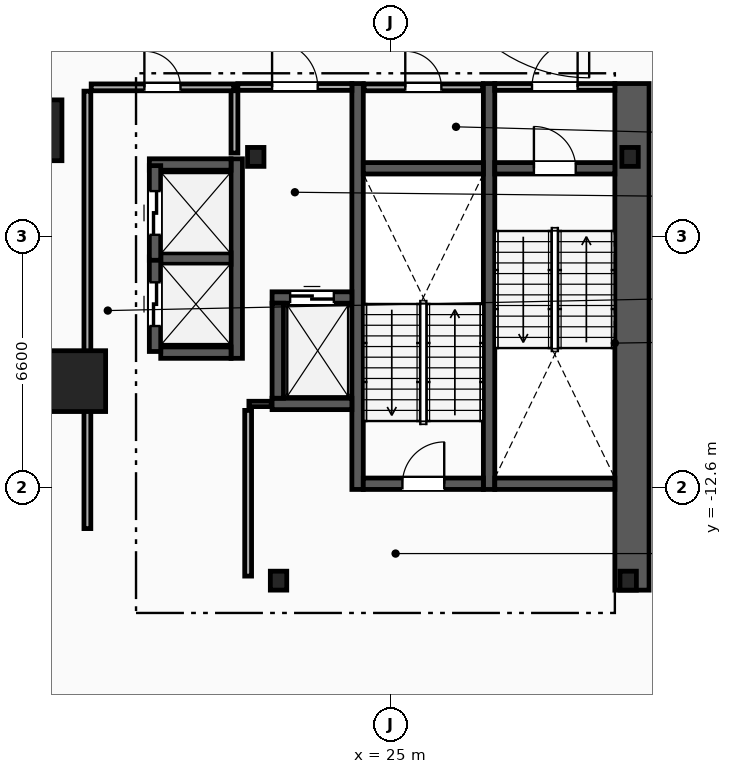
"""IFC4 building model, lengths in metres.
Left out: names, types, materials, properties, quantities, classifications, styles, units other than length and angle.
Written with IfcOpenShell. Run it as: python <this file> out.ifc"""

import sys

from ifc_helpers import new_model, si_unit, direction, frame, frame_2d, origin, origin_2d, place, context, subcontext, project, spatial, rectangle, i_section, extrude, element, fill, save


model = new_model("IFC4")
c1 = context("Model", 3, precision=1e-05, world=origin(), true_north=direction((0.0, 1.0)))
c2 = subcontext(c1, "Body", "Model", "MODEL_VIEW")
j1 = project(units=[si_unit("LENGTHUNIT", "METRE"), si_unit("PLANEANGLEUNIT", "RADIAN")], contexts=[c1])
p1 = place(None, origin())
s1 = spatial("IfcSite", under=j1, at=p1, CompositionType="ELEMENT")
p2 = place(p1, origin())
s2 = spatial("IfcBuilding", under=s1, at=p2, CompositionType="ELEMENT")
p3 = place(p2, frame((0.0, 0.0, -4.5)))
s3 = spatial("IfcBuildingStorey", under=s2, at=p3, CompositionType="ELEMENT", Elevation=-4.5)
for number, where, z_axis, x_axis in (
    (1, (31.3, -3.9, 0.0), (0.0, 0.0, 1.0), (1.0, 0.0, 0.0)),
    (2, (21.45, -3.9, 0.0), (0.0, 0.0, 1.0), (1.0, 0.0, 0.0)),
    (3, (22.05, -15.05, 0.0), (0.0, 0.0, 1.0), (1.0, 0.0, 0.0)),
    (4, (31.25, -15.05, 0.0), (0.0, 0.0, 1.0), (1.0, 0.0, 0.0)),
):
    element("IfcColumn", number, at=place(p3, frame(where, z_axis=z_axis, x_axis=x_axis)), inside=s3, PredefinedType="COLUMN", context=c2, shape_type="SweptSolid", body=[
        extrude(i_section(OverallWidth=0.432, OverallDepth=0.498, WebThickness=0.056, FlangeThickness=0.089, FilletRadius=0.018, at=origin_2d()), origin(), (0.0, 0.0, 1.0), 4.5),
    ])
for number, where, z_axis, x_axis in (
    (5, (15.55, -3.2, 0.0), (0.0, 0.0, 1.0), (1.0, 0.0, 0.0)),
    (6, (16.7, -9.8, 0.0), (0.0, 0.0, 1.0), (1.0, 0.0, 0.0)),
):
    element("IfcColumn", number, at=place(p3, frame(where, z_axis=z_axis, x_axis=x_axis)), inside=s3, PredefinedType="COLUMN", context=c2, shape_type="SweptSolid", body=[
        extrude(rectangle(XDim=1.6, YDim=1.6, at=origin_2d()), origin(), (0.0, 0.0, 1.0), 4.5),
    ])
p4 = place(p3, frame((31.35, -15.3, 0.0), z_axis=(0.0, 0.0, 1.0), x_axis=(0.0, 1.0, 0.0)))
e7 = element("IfcWall", 7, at=p4, inside=s3, PredefinedType="SHEAR", context=c2, shape_type="SweptSolid", body=[
    extrude(rectangle(XDim=13.33, YDim=0.9, at=frame_2d((6.665, 0.0))), origin(), (0.0, 0.0, 1.0), 4.15),
])
for number, where, z_axis, x_axis in (
    (8, (27.59, -12.65, 0.0), (0.0, 0.0, 1.0), (0.0, 1.0, 0.0)),
    (9, (24.13, -12.65, 0.0), (0.0, 0.0, 1.0), (0.0, 1.0, 0.0)),
):
    element("IfcWall", number, at=place(p3, frame(where, z_axis=z_axis, x_axis=x_axis)), inside=s3, PredefinedType="SHEAR", context=c2, shape_type="SweptSolid", body=[
        extrude(rectangle(XDim=10.68, YDim=0.3, at=frame_2d((5.34, 0.0))), origin(), (0.0, 0.0, 1.0), 4.15),
    ])
p5 = place(p3, frame((27.74, -4.2, 0.0), z_axis=(0.0, 0.0, 1.0), x_axis=(1.0, 0.0, 0.0)))
e10 = element("IfcWall", 10, at=p5, inside=s3, PredefinedType="SHEAR", context=c2, shape_type="SweptSolid", body=[
    extrude(rectangle(XDim=3.16, YDim=0.3, at=frame_2d((1.58, 0.0))), origin(), (0.0, 0.0, 1.0), 4.15),
])
p6 = place(p5, frame((1.03, 0.0, 0.0)))
e11 = element("IfcOpeningElement", 11, at=p6, cuts=e10, PredefinedType="OPENING", context=c2, shape_type="SweptSolid", body=[
    extrude(rectangle(XDim=1.1, YDim=2.15, at=frame_2d((0.55, 1.075))), frame((0.0, 0.16, 0.0), z_axis=(0.0, -1.0, 0.0), x_axis=(1.0, 0.0, 0.0)), (0.0, 0.0, 1.0), 0.32),
])
p7 = place(p3, frame((27.74, -12.5, 0.0), z_axis=(0.0, 0.0, 1.0), x_axis=(1.0, 0.0, 0.0)))
e12 = element("IfcWall", 12, at=p7, inside=s3, PredefinedType="SHEAR", context=c2, shape_type="SweptSolid", body=[
    extrude(rectangle(XDim=3.16, YDim=0.3, at=frame_2d((1.58, 0.0))), origin(), (0.0, 0.0, 1.0), 4.15),
])
p8 = place(p3, frame((24.28, -12.5, 0.0), z_axis=(0.0, 0.0, 1.0), x_axis=(1.0, 0.0, 0.0)))
e13 = element("IfcWall", 13, at=p8, inside=s3, PredefinedType="SHEAR", context=c2, shape_type="SweptSolid", body=[
    extrude(rectangle(XDim=3.16, YDim=0.3, at=frame_2d((1.58, 0.0))), origin(), (0.0, 0.0, 1.0), 4.15),
])
p9 = place(p8, frame((1.03, 0.0, 0.0)))
e14 = element("IfcOpeningElement", 14, at=p9, cuts=e13, PredefinedType="OPENING", context=c2, shape_type="SweptSolid", body=[
    extrude(rectangle(XDim=1.1, YDim=2.15, at=frame_2d((0.55, 1.075))), frame((0.0, 0.16, 0.0), z_axis=(0.0, -1.0, 0.0), x_axis=(1.0, 0.0, 0.0)), (0.0, 0.0, 1.0), 0.32),
])
p10 = place(p3, frame((24.28, -4.2, 0.0), z_axis=(0.0, 0.0, 1.0), x_axis=(1.0, 0.0, 0.0)))
e15 = element("IfcWall", 15, at=p10, inside=s3, PredefinedType="SHEAR", context=c2, shape_type="SweptSolid", body=[
    extrude(rectangle(XDim=3.16, YDim=0.3, at=frame_2d((1.58, 0.0))), origin(), (0.0, 0.0, 1.0), 4.15),
])
p11 = place(p3, frame((20.89, -3.8, 0.0), z_axis=(0.0, 0.0, 1.0), x_axis=(0.0, 1.0, 0.0)))
e16 = element("IfcWall", 16, at=p11, inside=s3, PredefinedType="PARTITIONING", context=c2, shape_type="SweptSolid", body=[
    extrude(rectangle(XDim=1.65, YDim=0.18, at=frame_2d((0.825, 0.0))), origin(), (0.0, 0.0, 1.0), 4.15),
])
p12 = place(p3, frame((20.98, -2.06, 0.0), z_axis=(0.0, 0.0, 1.0), x_axis=(1.0, 0.0, 0.0)))
e17 = element("IfcWall", 17, at=p12, inside=s3, PredefinedType="PARTITIONING", context=c2, shape_type="SweptSolid", body=[
    extrude(rectangle(XDim=3.0, YDim=0.18, at=frame_2d((1.5, 0.0))), origin(), (0.0, 0.0, 1.0), 4.15),
])
p13 = place(p12, frame((0.9, 0.0, 0.0)))
e18 = element("IfcOpeningElement", 18, at=p13, cuts=e17, PredefinedType="OPENING", context=c2, shape_type="SweptSolid", body=[
    extrude(rectangle(XDim=1.2, YDim=2.15, at=frame_2d((0.6, 1.075))), frame((0.0, 0.1, 0.0), z_axis=(0.0, -1.0, 0.0), x_axis=(1.0, 0.0, 0.0)), (0.0, 0.0, 1.0), 0.2),
])
p14 = place(p3, frame((27.74, -2.06, 0.0), z_axis=(0.0, 0.0, 1.0), x_axis=(1.0, 0.0, 0.0)))
e19 = element("IfcWall", 19, at=p14, inside=s3, PredefinedType="PARTITIONING", context=c2, shape_type="SweptSolid", body=[
    extrude(rectangle(XDim=3.16, YDim=0.18, at=frame_2d((1.58, 0.0))), origin(), (0.0, 0.0, 1.0), 4.15),
])
p15 = place(p14, frame((0.98, 0.0, 0.0)))
e20 = element("IfcOpeningElement", 20, at=p15, cuts=e19, PredefinedType="OPENING", context=c2, shape_type="SweptSolid", body=[
    extrude(rectangle(XDim=1.2, YDim=2.15, at=frame_2d((0.6, 1.075))), frame((0.0, 0.1, 0.0), z_axis=(0.0, -1.0, 0.0), x_axis=(1.0, 0.0, 0.0)), (0.0, 0.0, 1.0), 0.2),
])
p16 = place(p3, frame((21.88, -7.6, 0.0), z_axis=(0.0, 0.0, 1.0), x_axis=(1.0, 0.0, 0.0)))
e21 = element("IfcWall", 21, at=p16, inside=s3, PredefinedType="SHEAR", context=c2, shape_type="SweptSolid", body=[
    extrude(rectangle(XDim=2.1, YDim=0.3, at=frame_2d((1.05, 0.0))), origin(), (0.0, 0.0, 1.0), 4.15),
])
p17 = place(p16, frame((0.475, 0.0, 0.0)))
e22 = element("IfcOpeningElement", 22, at=p17, cuts=e21, PredefinedType="OPENING", context=c2, shape_type="SweptSolid", body=[
    extrude(rectangle(XDim=1.15, YDim=2.2, at=frame_2d((0.575, 1.1))), frame((0.0, 0.16, 0.0), z_axis=(0.0, -1.0, 0.0), x_axis=(1.0, 0.0, 0.0)), (0.0, 0.0, 1.0), 0.32),
])
p18 = place(p3, frame((21.88, -10.4, 0.0), z_axis=(0.0, 0.0, 1.0), x_axis=(1.0, 0.0, 0.0)))
e23 = element("IfcWall", 23, at=p18, inside=s3, PredefinedType="SHEAR", context=c2, shape_type="SweptSolid", body=[
    extrude(rectangle(XDim=2.1, YDim=0.3, at=frame_2d((1.05, 0.0))), origin(), (0.0, 0.0, 1.0), 4.15),
])
p19 = place(p3, frame((22.03, -10.25, 0.0), z_axis=(0.0, 0.0, 1.0), x_axis=(0.0, 1.0, 0.0)))
e24 = element("IfcWall", 24, at=p19, inside=s3, PredefinedType="SHEAR", context=c2, shape_type="SweptSolid", body=[
    extrude(rectangle(XDim=2.5, YDim=0.3, at=frame_2d((1.25, 0.0))), origin(), (0.0, 0.0, 1.0), 4.15),
])
p20 = place(p3, frame((20.95, -9.2, 0.0), z_axis=(0.0, 0.0, 1.0), x_axis=(0.0, 1.0, 0.0)))
e25 = element("IfcWall", 25, at=p20, inside=s3, PredefinedType="SHEAR", context=c2, shape_type="SweptSolid", body=[
    extrude(rectangle(XDim=5.25, YDim=0.3, at=frame_2d((2.625, 0.0))), origin(), (0.0, 0.0, 1.0), 4.15),
])
p21 = place(p3, frame((18.95, -9.05, 0.0), z_axis=(0.0, 0.0, 1.0), x_axis=(1.0, 0.0, 0.0)))
e26 = element("IfcWall", 26, at=p21, inside=s3, PredefinedType="SHEAR", context=c2, shape_type="SweptSolid", body=[
    extrude(rectangle(XDim=1.85, YDim=0.3, at=frame_2d((0.925, 0.0))), origin(), (0.0, 0.0, 1.0), 4.15),
])
p22 = place(p3, frame((18.65, -4.1, 0.0), z_axis=(0.0, 0.0, 1.0), x_axis=(1.0, 0.0, 0.0)))
e27 = element("IfcWall", 27, at=p22, inside=s3, PredefinedType="SHEAR", context=c2, shape_type="SweptSolid", body=[
    extrude(rectangle(XDim=2.15, YDim=0.3, at=frame_2d((1.075, 0.0))), origin(), (0.0, 0.0, 1.0), 4.15),
])
p23 = place(p3, frame((18.95, -6.575, 0.0), z_axis=(0.0, 0.0, 1.0), x_axis=(1.0, 0.0, 0.0)))
e28 = element("IfcWall", 28, at=p23, inside=s3, PredefinedType="SHEAR", context=c2, shape_type="SweptSolid", body=[
    extrude(rectangle(XDim=1.85, YDim=0.3, at=frame_2d((0.925, 0.0))), origin(), (0.0, 0.0, 1.0), 4.15),
])
p24 = place(p3, frame((18.8, -9.02, 0.0), z_axis=(0.0, 0.0, 1.0), x_axis=(0.0, 1.0, 0.0)))
e29 = element("IfcWall", 29, at=p24, inside=s3, PredefinedType="SHEAR", context=c2, shape_type="SweptSolid", body=[
    extrude(rectangle(XDim=2.49, YDim=0.3, at=frame_2d((1.245, 0.0))), origin(), (0.0, 0.0, 1.0), 4.15),
])
p25 = place(p24, frame((0.67, 0.0, 0.0)))
e30 = element("IfcOpeningElement", 30, at=p25, cuts=e29, PredefinedType="OPENING", context=c2, shape_type="SweptSolid", body=[
    extrude(rectangle(XDim=1.15, YDim=2.2, at=frame_2d((0.575, 1.1))), frame((0.0, 0.16, 0.0), z_axis=(0.0, -1.0, 0.0), x_axis=(1.0, 0.0, 0.0)), (0.0, 0.0, 1.0), 0.32),
])
p26 = place(p3, frame((18.8, -6.62, 0.0), z_axis=(0.0, 0.0, 1.0), x_axis=(0.0, 1.0, 0.0)))
e31 = element("IfcWall", 31, at=p26, inside=s3, PredefinedType="SHEAR", context=c2, shape_type="SweptSolid", body=[
    extrude(rectangle(XDim=2.49, YDim=0.3, at=frame_2d((1.245, 0.0))), origin(), (0.0, 0.0, 1.0), 4.15),
])
p27 = place(p26, frame((0.67, 0.0, 0.0)))
e32 = element("IfcOpeningElement", 32, at=p27, cuts=e31, PredefinedType="OPENING", context=c2, shape_type="SweptSolid", body=[
    extrude(rectangle(XDim=1.15, YDim=2.2, at=frame_2d((0.575, 1.1))), frame((0.0, 0.16, 0.0), z_axis=(0.0, -1.0, 0.0), x_axis=(1.0, 0.0, 0.0)), (0.0, 0.0, 1.0), 0.32),
])
p28 = place(p3, frame((17.02, -13.68, 0.0), z_axis=(0.0, 0.0, 1.0), x_axis=(0.0, 1.0, 0.0)))
e33 = element("IfcWall", 33, at=p28, inside=s3, PredefinedType="PARTITIONING", context=c2, shape_type="SweptSolid", body=[
    extrude(rectangle(XDim=11.51, YDim=0.18, at=frame_2d((5.755, 0.0))), origin(), (0.0, 0.0, 1.0), 4.15),
])
p29 = place(p3, frame((17.12, -2.07, 0.0), z_axis=(0.0, 0.0, 1.0), x_axis=(1.0, 0.0, 0.0)))
e34 = element("IfcWall", 34, at=p29, inside=s3, PredefinedType="PARTITIONING", context=c2, shape_type="SweptSolid", body=[
    extrude(rectangle(XDim=3.75, YDim=0.18, at=frame_2d((1.875, 0.0))), origin(), (0.0, 0.0, 1.0), 4.15),
])
p30 = place(p29, frame((1.4, 0.0, 0.0)))
e35 = element("IfcOpeningElement", 35, at=p30, cuts=e34, PredefinedType="OPENING", context=c2, shape_type="SweptSolid", body=[
    extrude(rectangle(XDim=0.95, YDim=2.1, at=frame_2d((0.475, 1.05))), frame((0.0, 0.1, 0.0), z_axis=(0.0, -1.0, 0.0), x_axis=(1.0, 0.0, 0.0)), (0.0, 0.0, 1.0), 0.2),
])
p31 = place(p3, frame((21.27, -10.4, 0.0), z_axis=(0.0, 0.0, 1.0), x_axis=(1.0, 0.0, 0.0)))
e36 = element("IfcWall", 36, at=p31, inside=s3, PredefinedType="PARTITIONING", context=c2, shape_type="SweptSolid", body=[
    extrude(rectangle(XDim=0.59, YDim=0.14, at=frame_2d((0.295, 0.0))), origin(), (0.0, 0.0, 1.0), 4.15),
])
p32 = place(p3, frame((21.25, -14.93, 0.0), z_axis=(0.0, 0.0, 1.0), x_axis=(0.0, 1.0, 0.0)))
e37 = element("IfcWall", 37, at=p32, inside=s3, PredefinedType="PARTITIONING", context=c2, shape_type="SweptSolid", body=[
    extrude(rectangle(XDim=4.36, YDim=0.18, at=frame_2d((2.18, 0.0))), origin(), (0.0, 0.0, 1.0), 4.15),
])
p33 = place(p3, frame((24.3, -2.07, 0.0), z_axis=(0.0, 0.0, 1.0), x_axis=(1.0, 0.0, 0.0)))
e38 = element("IfcWall", 38, at=p33, inside=s3, PredefinedType="PARTITIONING", context=c2, shape_type="SweptSolid", body=[
    extrude(rectangle(XDim=3.12, YDim=0.18, at=frame_2d((1.56, 0.0))), origin(), (0.0, 0.0, 1.0), 4.15),
])
p34 = place(p33, frame((1.085, 0.0, 0.0)))
e39 = element("IfcOpeningElement", 39, at=p34, cuts=e38, PredefinedType="OPENING", context=c2, shape_type="SweptSolid", body=[
    extrude(rectangle(XDim=0.95, YDim=2.1, at=frame_2d((0.475, 1.05))), frame((0.0, 0.1, 0.0), z_axis=(0.0, -1.0, 0.0), x_axis=(1.0, 0.0, 0.0)), (0.0, 0.0, 1.0), 0.2),
])
p35 = place(p6, origin())
e40 = element("IfcDoor", 40, at=p35, inside=s3, OperationType="SINGLE_SWING_LEFT", PredefinedType="DOOR", context=c2, shape_type="SweptSolid", body=[
    extrude(rectangle(XDim=1.1, YDim=2.15, at=frame_2d((0.55, 1.075))), frame((0.0, 0.025, 0.0), z_axis=(0.0, -1.0, 0.0), x_axis=(1.0, 0.0, 0.0)), (0.0, 0.0, 1.0), 0.05),
])
fill(e11, e40)
p36 = place(p9, origin())
e41 = element("IfcDoor", 41, at=p36, inside=s3, OperationType="SINGLE_SWING_RIGHT", PredefinedType="DOOR", context=c2, shape_type="SweptSolid", body=[
    extrude(rectangle(XDim=1.1, YDim=2.15, at=frame_2d((0.55, 1.075))), frame((0.0, 0.025, 0.0), z_axis=(0.0, -1.0, 0.0), x_axis=(1.0, 0.0, 0.0)), (0.0, 0.0, 1.0), 0.05),
])
fill(e14, e41)
p37 = place(p13, origin())
e42 = element("IfcDoor", 42, at=p37, inside=s3, OperationType="SINGLE_SWING_LEFT", PredefinedType="DOOR", context=c2, shape_type="SweptSolid", body=[
    extrude(rectangle(XDim=1.2, YDim=2.15, at=frame_2d((0.6, 1.075))), frame((0.0, 0.025, 0.0), z_axis=(0.0, -1.0, 0.0), x_axis=(1.0, 0.0, 0.0)), (0.0, 0.0, 1.0), 0.05),
])
fill(e18, e42)
p38 = place(p15, origin())
e43 = element("IfcDoor", 43, at=p38, inside=s3, OperationType="SINGLE_SWING_RIGHT", PredefinedType="DOOR", context=c2, shape_type="SweptSolid", body=[
    extrude(rectangle(XDim=1.2, YDim=2.15, at=frame_2d((0.6, 1.075))), frame((0.0, 0.025, 0.0), z_axis=(0.0, -1.0, 0.0), x_axis=(1.0, 0.0, 0.0)), (0.0, 0.0, 1.0), 0.05),
])
fill(e20, e43)
p39 = place(p17, origin())
e44 = element("IfcDoor", 44, at=p39, inside=s3, OperationType="SLIDING_TO_LEFT", PredefinedType="TRAPDOOR", context=c2, shape_type="SweptSolid", body=[
    extrude(rectangle(XDim=1.15, YDim=2.2, at=frame_2d((0.575, 1.1))), frame((0.0, 0.025, 0.0), z_axis=(0.0, -1.0, 0.0), x_axis=(1.0, 0.0, 0.0)), (0.0, 0.0, 1.0), 0.05),
])
fill(e22, e44)
p40 = place(p25, origin())
e45 = element("IfcDoor", 45, at=p40, inside=s3, OperationType="SLIDING_TO_LEFT", PredefinedType="TRAPDOOR", context=c2, shape_type="SweptSolid", body=[
    extrude(rectangle(XDim=1.15, YDim=2.2, at=frame_2d((0.575, 1.1))), frame((0.0, 0.025, 0.0), z_axis=(0.0, -1.0, 0.0), x_axis=(1.0, 0.0, 0.0)), (0.0, 0.0, 1.0), 0.05),
])
fill(e30, e45)
p41 = place(p27, origin())
e46 = element("IfcDoor", 46, at=p41, inside=s3, OperationType="SLIDING_TO_LEFT", PredefinedType="TRAPDOOR", context=c2, shape_type="SweptSolid", body=[
    extrude(rectangle(XDim=1.15, YDim=2.2, at=frame_2d((0.575, 1.1))), frame((0.0, 0.025, 0.0), z_axis=(0.0, -1.0, 0.0), x_axis=(1.0, 0.0, 0.0)), (0.0, 0.0, 1.0), 0.05),
])
fill(e32, e46)
p42 = place(p30, origin())
e47 = element("IfcDoor", 47, at=p42, inside=s3, OperationType="SINGLE_SWING_LEFT", PredefinedType="DOOR", context=c2, shape_type="SweptSolid", body=[
    extrude(rectangle(XDim=0.95, YDim=2.1, at=frame_2d((0.475, 1.05))), frame((0.0, 0.025, 0.0), z_axis=(0.0, -1.0, 0.0), x_axis=(1.0, 0.0, 0.0)), (0.0, 0.0, 1.0), 0.05),
])
fill(e35, e47)
p43 = place(p34, origin())
e48 = element("IfcDoor", 48, at=p43, inside=s3, OperationType="SINGLE_SWING_LEFT", PredefinedType="DOOR", context=c2, shape_type="SweptSolid", body=[
    extrude(rectangle(XDim=0.95, YDim=2.1, at=frame_2d((0.475, 1.05))), frame((0.0, 0.025, 0.0), z_axis=(0.0, -1.0, 0.0), x_axis=(1.0, 0.0, 0.0)), (0.0, 0.0, 1.0), 0.05),
])
fill(e39, e48)
save(model, sys.argv[1])
